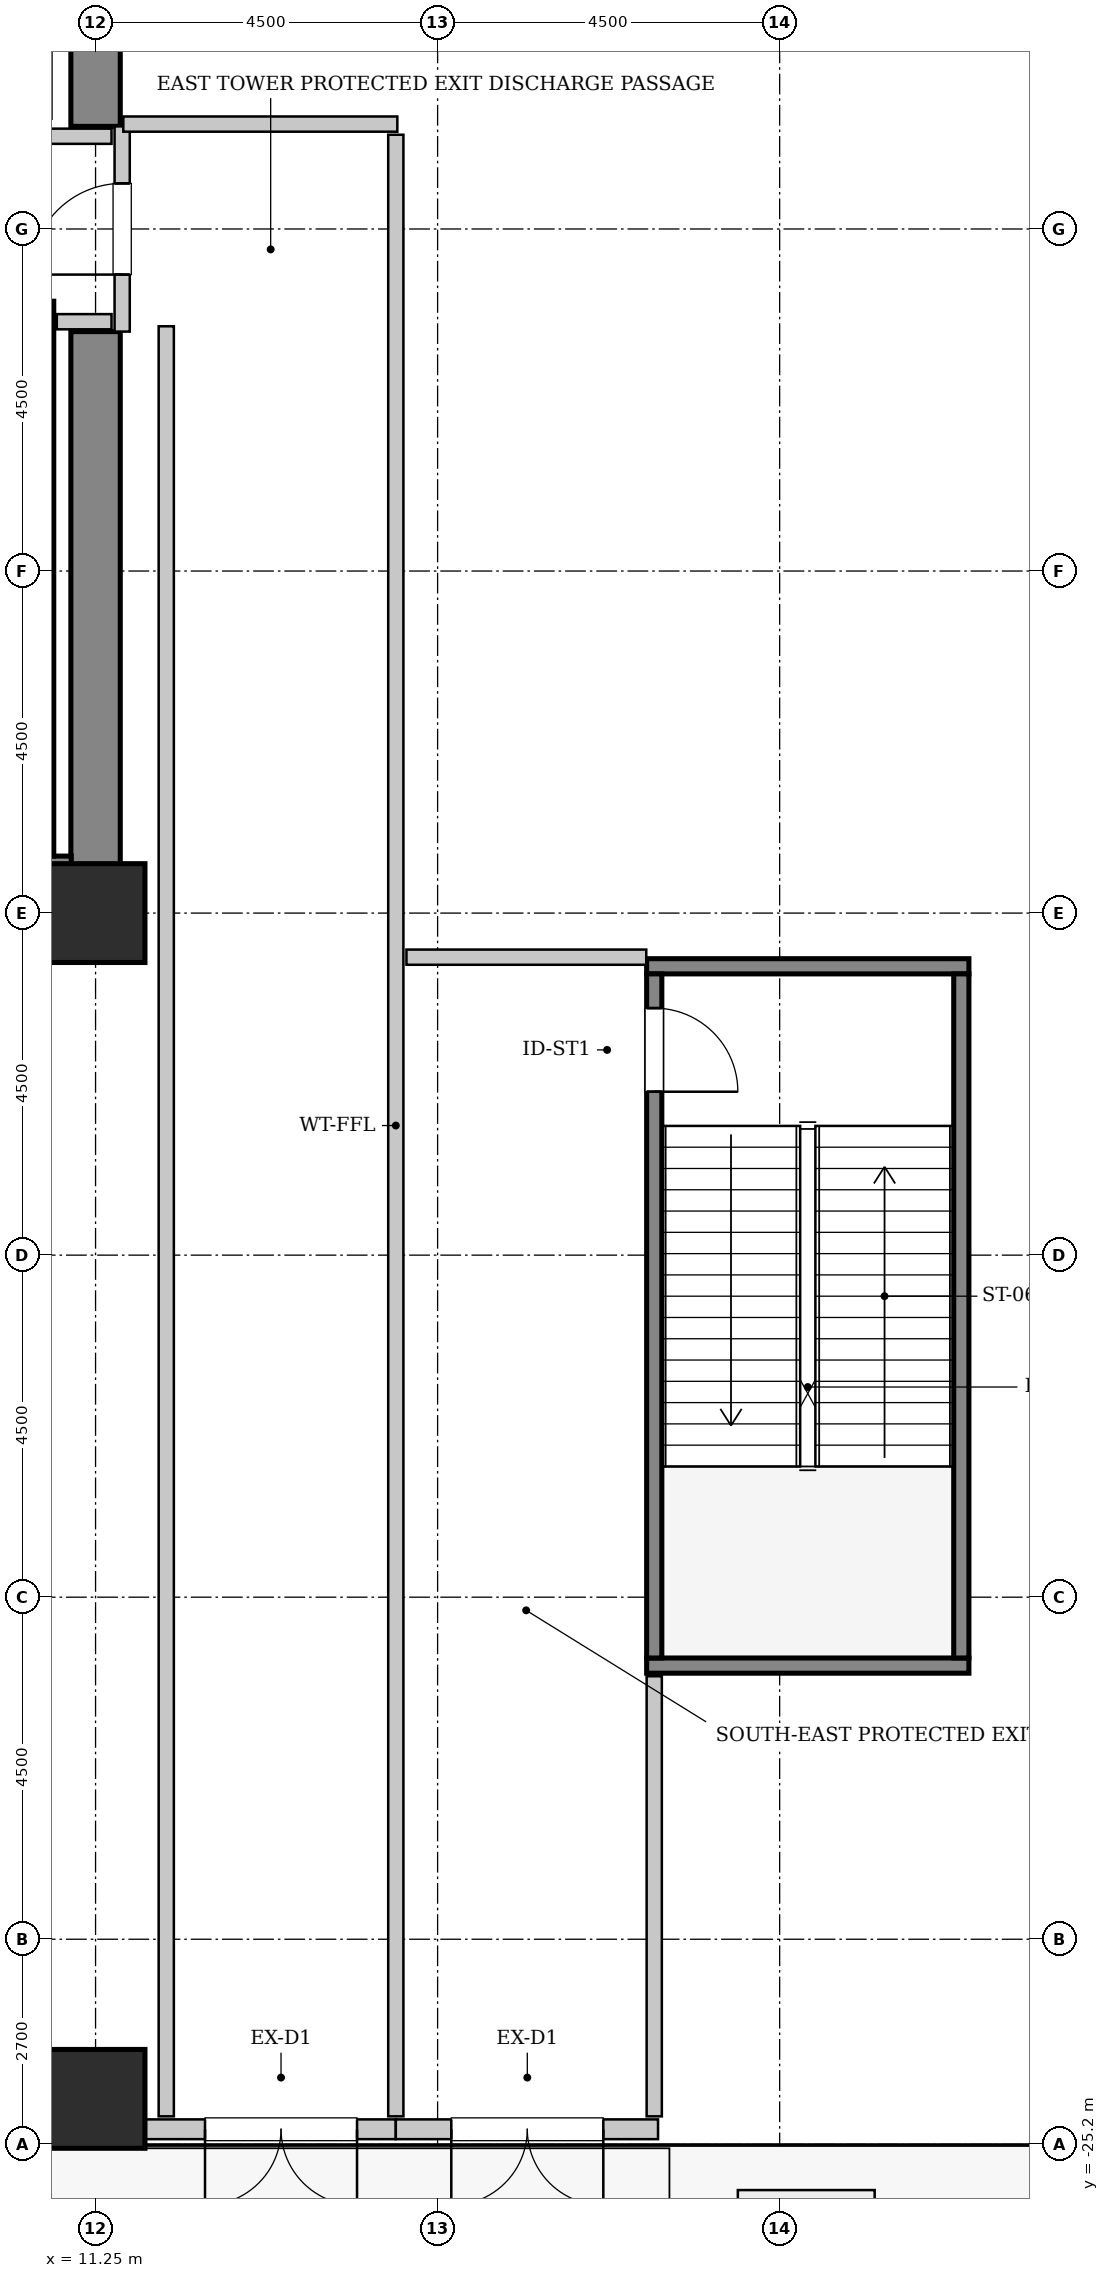
"""IFC4 building model, lengths in metres.
Left out: names, types, materials, properties, quantities, classifications, styles, units other than length and angle.
Written with IfcOpenShell. Run it as: python <this file> out.ifc"""

import sys

from ifc_helpers import new_model, si_unit, direction, frame, frame_2d, origin, origin_2d, place, context, subcontext, project, spatial, rectangle, hollow_rectangle, extrude, source, transform, mapped, element, fill, save


model = new_model("IFC4")
c1 = context("Model", 3, precision=1e-05, world=origin(), true_north=direction((0.0, 1.0)))
c2 = subcontext(c1, "Body", "Model", "MODEL_VIEW")
j1 = project(units=[si_unit("LENGTHUNIT", "METRE"), si_unit("PLANEANGLEUNIT", "RADIAN")], contexts=[c1])
p1 = place(None, origin())
s1 = spatial("IfcSite", under=j1, at=p1, CompositionType="ELEMENT")
p2 = place(p1, origin())
s2 = spatial("IfcBuilding", under=s1, at=p2, CompositionType="ELEMENT")
p3 = place(p2, origin())
s3 = spatial("IfcBuildingStorey", under=s2, at=p3, CompositionType="ELEMENT", Elevation=0.0)
m1 = source(origin(), c2, "Body", "SweptSolid", [
    extrude(rectangle(XDim=10.025, YDim=0.65, at=frame_2d((5.012, 0.0))), origin(), (0.0, 0.0, 1.0), 6.0),
])
p4 = place(p3, frame((1.55, -9.0, 0.0), z_axis=(0.0, 0.0, 1.0), x_axis=(1.0, 0.0, 0.0)))
e1 = element("IfcWall", 1, at=p4, inside=s3, PredefinedType="SHEAR", context=c2, shape_type="MappedRepresentation", body=[
    mapped(m1, transform((0.0, 0.0, 0.0), x_axis=(1.0, 0.0, 0.0), y_axis=(0.0, 1.0, 0.0), z_axis=(0.0, 0.0, 1.0), scale=1.0)),
])
m2 = source(origin(), c2, "Body", "SweptSolid", [
    extrude(rectangle(XDim=7.325, YDim=0.65, at=frame_2d((3.663, 0.0))), origin(), (0.0, 0.0, 1.0), 6.0),
])
for number, where, z_axis, x_axis in (
    (2, (11.25, -8.675, 0.0), (0.0, 0.0, 1.0), (0.0, 1.0, 0.0)),
    (3, (11.25, 1.35, 0.0), (0.0, 0.0, 1.0), (0.0, 1.0, 0.0)),
):
    element("IfcWall", number, at=place(p3, frame(where, z_axis=z_axis, x_axis=x_axis)), inside=s3, PredefinedType="SHEAR", context=c2, shape_type="MappedRepresentation", body=[
        mapped(m2, transform((0.0, 0.0, 0.0), x_axis=(1.0, 0.0, 0.0), y_axis=(0.0, 1.0, 0.0), z_axis=(0.0, 0.0, 1.0), scale=1.0)),
    ])
m3 = source(origin(), c2, "Body", "SweptSolid", [
    extrude(hollow_rectangle(XDim=1.3, YDim=1.3, WallThickness=0.065, InnerFilletRadius=0.065, OuterFilletRadius=0.13, at=origin_2d()), origin(), (0.0, 0.0, 1.0), 6.0),
])
for number, where, z_axis, x_axis in (
    (4, (11.25, -24.6, 0.0), (0.0, 0.0, 1.0), (1.0, 0.0, 0.0)),
    (5, (11.25, -9.0, 0.0), (0.0, 0.0, 1.0), (1.0, 0.0, 0.0)),
):
    element("IfcColumn", number, at=place(p3, frame(where, z_axis=z_axis, x_axis=x_axis)), inside=s3, PredefinedType="COLUMN", context=c2, shape_type="MappedRepresentation", body=[
        mapped(m3, transform((0.0, 0.0, 0.0), x_axis=(1.0, 0.0, 0.0), y_axis=(0.0, 1.0, 0.0), z_axis=(0.0, 0.0, 1.0), scale=1.0)),
    ])
m4 = source(origin(), c2, "Body", "SweptSolid", [
    extrude(rectangle(XDim=3.32, YDim=0.26, at=frame_2d((1.66, 0.0))), origin(), (0.0, 0.0, 1.0), 5.7),
])
p5 = place(p3, frame((15.2, -25.0, 0.0), z_axis=(0.0, 0.0, 1.0), x_axis=(-1.0, 0.0, 0.0)))
e6 = element("IfcWall", 6, at=p5, inside=s3, PredefinedType="SOLIDWALL", context=c2, shape_type="MappedRepresentation", body=[
    mapped(m4, transform((0.0, 0.0, 0.0), x_axis=(1.0, 0.0, 0.0), y_axis=(0.0, 1.0, 0.0), z_axis=(0.0, 0.0, 1.0), scale=1.0)),
])
p6 = place(p5, frame((0.51, 0.0, 0.0)))
e7 = element("IfcOpeningElement", 7, at=p6, cuts=e6, PredefinedType="OPENING", context=c2, shape_type="SweptSolid", body=[
    extrude(rectangle(XDim=2.0, YDim=2.4, at=frame_2d((1.0, 1.2))), frame((0.0, 0.14, 0.0), z_axis=(0.0, -1.0, 0.0), x_axis=(1.0, 0.0, 0.0)), (0.0, 0.0, 1.0), 0.28),
])
m5 = source(origin(), c2, "Body", "SweptSolid", [
    extrude(rectangle(XDim=3.45, YDim=0.26, at=frame_2d((1.725, 0.0))), origin(), (0.0, 0.0, 1.0), 5.7),
])
p7 = place(p3, frame((18.65, -25.0, 0.0), z_axis=(0.0, 0.0, 1.0), x_axis=(-1.0, 0.0, 0.0)))
e8 = element("IfcWall", 8, at=p7, inside=s3, PredefinedType="SOLIDWALL", context=c2, shape_type="MappedRepresentation", body=[
    mapped(m5, transform((0.0, 0.0, 0.0), x_axis=(1.0, 0.0, 0.0), y_axis=(0.0, 1.0, 0.0), z_axis=(0.0, 0.0, 1.0), scale=1.0)),
])
p8 = place(p7, frame((0.72, 0.0, 0.0)))
e9 = element("IfcOpeningElement", 9, at=p8, cuts=e8, PredefinedType="OPENING", context=c2, shape_type="SweptSolid", body=[
    extrude(rectangle(XDim=2.0, YDim=2.4, at=frame_2d((1.0, 1.2))), frame((0.0, 0.14, 0.0), z_axis=(0.0, -1.0, 0.0), x_axis=(1.0, 0.0, 0.0)), (0.0, 0.0, 1.0), 0.28),
])
m6 = source(origin(), c2, "Body", "SweptSolid", [
    extrude(rectangle(XDim=3.4, YDim=0.2, at=frame_2d((1.7, 0.0))), origin(), (0.0, 0.0, 1.0), 6.0),
])
p9 = place(p3, frame((7.3, -1.05, 0.0), z_axis=(0.0, 0.0, 1.0), x_axis=(1.0, 0.0, 0.0)))
e10 = element("IfcWall", 10, at=p9, inside=s3, PredefinedType="SOLIDWALL", context=c2, shape_type="MappedRepresentation", body=[
    mapped(m6, transform((0.0, 0.0, 0.0), x_axis=(1.0, 0.0, 0.0), y_axis=(0.0, 1.0, 0.0), z_axis=(0.0, 0.0, 1.0), scale=1.0)),
])
m7 = source(origin(), c2, "Body", "SweptSolid", [
    extrude(rectangle(XDim=3.63, YDim=0.2, at=frame_2d((1.815, 0.0))), origin(), (0.0, 0.0, 1.0), 6.0),
])
p10 = place(p3, frame((7.3, -8.35, 0.0), z_axis=(0.0, 0.0, 1.0), x_axis=(1.0, 0.0, 0.0)))
e11 = element("IfcWall", 11, at=p10, inside=s3, PredefinedType="SOLIDWALL", context=c2, shape_type="MappedRepresentation", body=[
    mapped(m7, transform((0.0, 0.0, 0.0), x_axis=(1.0, 0.0, 0.0), y_axis=(0.0, 1.0, 0.0), z_axis=(0.0, 0.0, 1.0), scale=1.0)),
])
m8 = source(origin(), c2, "Body", "SweptSolid", [
    extrude(rectangle(XDim=7.1, YDim=0.2, at=frame_2d((3.55, 0.0))), origin(), (0.0, 0.0, 1.0), 6.0),
])
p11 = place(p3, frame((10.6, -1.15, 0.0), z_axis=(0.0, 0.0, 1.0), x_axis=(0.0, -1.0, 0.0)))
e12 = element("IfcWall", 12, at=p11, inside=s3, PredefinedType="SOLIDWALL", context=c2, shape_type="MappedRepresentation", body=[
    mapped(m8, transform((0.0, 0.0, 0.0), x_axis=(1.0, 0.0, 0.0), y_axis=(0.0, 1.0, 0.0), z_axis=(0.0, 0.0, 1.0), scale=1.0)),
])
m9 = source(origin(), c2, "Body", "SweptSolid", [
    extrude(rectangle(XDim=4.24, YDim=0.2, at=frame_2d((2.12, 0.0))), origin(), (0.0, 0.0, 1.0), 6.0),
])
for number, where, z_axis, x_axis in (
    (13, (18.5, -9.7, 0.0), (0.0, 0.0, 1.0), (1.0, 0.0, 0.0)),
    (14, (18.5, -18.9, 0.0), (0.0, 0.0, 1.0), (1.0, 0.0, 0.0)),
):
    element("IfcWall", number, at=place(p3, frame(where, z_axis=z_axis, x_axis=x_axis)), inside=s3, PredefinedType="SOLIDWALL", context=c2, shape_type="MappedRepresentation", body=[
        mapped(m9, transform((0.0, 0.0, 0.0), x_axis=(1.0, 0.0, 0.0), y_axis=(0.0, 1.0, 0.0), z_axis=(0.0, 0.0, 1.0), scale=1.0)),
    ])
m10 = source(origin(), c2, "Body", "SweptSolid", [
    extrude(rectangle(XDim=9.0, YDim=0.2, at=frame_2d((4.5, 0.0))), origin(), (0.0, 0.0, 1.0), 6.0),
])
p12 = place(p3, frame((18.6, -9.8, 0.0), z_axis=(0.0, 0.0, 1.0), x_axis=(0.0, -1.0, 0.0)))
e15 = element("IfcWall", 15, at=p12, inside=s3, PredefinedType="SOLIDWALL", context=c2, shape_type="MappedRepresentation", body=[
    mapped(m10, transform((0.0, 0.0, 0.0), x_axis=(1.0, 0.0, 0.0), y_axis=(0.0, 1.0, 0.0), z_axis=(0.0, 0.0, 1.0), scale=1.0)),
])
p13 = place(p12, frame((0.45, 0.0, 0.0)))
e16 = element("IfcOpeningElement", 16, at=p13, cuts=e15, PredefinedType="OPENING", context=c2, shape_type="SweptSolid", body=[
    extrude(rectangle(XDim=1.1, YDim=2.15, at=frame_2d((0.55, 1.075))), frame((0.0, 0.11, 0.0), z_axis=(0.0, -1.0, 0.0), x_axis=(1.0, 0.0, 0.0)), (0.0, 0.0, 1.0), 0.22),
])
p14 = place(p3, frame((22.64, -9.8, 0.0), z_axis=(0.0, 0.0, 1.0), x_axis=(0.0, -1.0, 0.0)))
e17 = element("IfcWall", 17, at=p14, inside=s3, PredefinedType="SOLIDWALL", context=c2, shape_type="MappedRepresentation", body=[
    mapped(m10, transform((0.0, 0.0, 0.0), x_axis=(1.0, 0.0, 0.0), y_axis=(0.0, 1.0, 0.0), z_axis=(0.0, 0.0, 1.0), scale=1.0)),
])
m11 = source(origin(), c2, "Body", "SweptSolid", [
    extrude(rectangle(XDim=2.7, YDim=0.2, at=frame_2d((1.35, 0.0))), origin(), (0.0, 0.0, 1.0), 4.575),
])
p15 = place(p3, frame((11.6, -1.35, 0.0), z_axis=(0.0, 0.0, 1.0), x_axis=(0.0, 1.0, 0.0)))
e18 = element("IfcWall", 18, at=p15, inside=s3, PredefinedType="PARTITIONING", context=c2, shape_type="MappedRepresentation", body=[
    mapped(m11, transform((0.0, 0.0, 0.0), x_axis=(1.0, 0.0, 0.0), y_axis=(0.0, 1.0, 0.0), z_axis=(0.0, 0.0, 1.0), scale=1.0)),
])
p16 = place(p15, frame((0.75, 0.0, 0.0)))
e19 = element("IfcOpeningElement", 19, at=p16, cuts=e18, PredefinedType="OPENING", context=c2, shape_type="SweptSolid", body=[
    extrude(rectangle(XDim=1.2, YDim=2.15, at=frame_2d((0.6, 1.075))), frame((0.0, 0.11, 0.0), z_axis=(0.0, -1.0, 0.0), x_axis=(1.0, 0.0, 0.0)), (0.0, 0.0, 1.0), 0.22),
])
m12 = source(origin(), c2, "Body", "SweptSolid", [
    extrude(rectangle(XDim=4.11, YDim=0.2, at=frame_2d((2.055, 0.0))), origin(), (0.0, 0.0, 1.0), 5.685),
])
p17 = place(p3, frame((7.35, 1.22, 0.0), z_axis=(0.0, 0.0, 1.0), x_axis=(1.0, 0.0, 0.0)))
e20 = element("IfcWall", 20, at=p17, inside=s3, PredefinedType="PARTITIONING", context=c2, shape_type="MappedRepresentation", body=[
    mapped(m12, transform((0.0, 0.0, 0.0), x_axis=(1.0, 0.0, 0.0), y_axis=(0.0, 1.0, 0.0), z_axis=(0.0, 0.0, 1.0), scale=1.0)),
])
m13 = source(origin(), c2, "Body", "SweptSolid", [
    extrude(rectangle(XDim=0.72, YDim=0.2, at=frame_2d((0.36, 0.0))), origin(), (0.0, 0.0, 1.0), 5.685),
])
p18 = place(p3, frame((10.74, -1.22, 0.0), z_axis=(0.0, 0.0, 1.0), x_axis=(1.0, 0.0, 0.0)))
e21 = element("IfcWall", 21, at=p18, inside=s3, PredefinedType="PARTITIONING", context=c2, shape_type="MappedRepresentation", body=[
    mapped(m13, transform((0.0, 0.0, 0.0), x_axis=(1.0, 0.0, 0.0), y_axis=(0.0, 1.0, 0.0), z_axis=(0.0, 0.0, 1.0), scale=1.0)),
])
m14 = source(origin(), c2, "Body", "SweptSolid", [
    extrude(rectangle(XDim=23.55, YDim=0.2, at=frame_2d((11.775, 0.0))), origin(), (0.0, 0.0, 1.0), 5.685),
])
p19 = place(p3, frame((12.18, -24.83, 0.0), z_axis=(0.0, 0.0, 1.0), x_axis=(0.0, 1.0, 0.0)))
e22 = element("IfcWall", 22, at=p19, inside=s3, PredefinedType="PARTITIONING", context=c2, shape_type="MappedRepresentation", body=[
    mapped(m14, transform((0.0, 0.0, 0.0), x_axis=(1.0, 0.0, 0.0), y_axis=(0.0, 1.0, 0.0), z_axis=(0.0, 0.0, 1.0), scale=1.0)),
])
m15 = source(origin(), c2, "Body", "SweptSolid", [
    extrude(rectangle(XDim=3.605, YDim=0.2, at=frame_2d((1.802, 0.0))), origin(), (0.0, 0.0, 1.0), 5.685),
])
p20 = place(p3, frame((11.615, 1.38, 0.0), z_axis=(0.0, 0.0, 1.0), x_axis=(1.0, 0.0, 0.0)))
e23 = element("IfcWall", 23, at=p20, inside=s3, PredefinedType="PARTITIONING", context=c2, shape_type="MappedRepresentation", body=[
    mapped(m15, transform((0.0, 0.0, 0.0), x_axis=(1.0, 0.0, 0.0), y_axis=(0.0, 1.0, 0.0), z_axis=(0.0, 0.0, 1.0), scale=1.0)),
])
m16 = source(origin(), c2, "Body", "SweptSolid", [
    extrude(rectangle(XDim=26.07, YDim=0.2, at=frame_2d((13.035, 0.0))), origin(), (0.0, 0.0, 1.0), 5.685),
])
p21 = place(p3, frame((15.2, -24.83, 0.0), z_axis=(0.0, 0.0, 1.0), x_axis=(0.0, 1.0, 0.0)))
e24 = element("IfcWall", 24, at=p21, inside=s3, PredefinedType="PARTITIONING", context=c2, shape_type="MappedRepresentation", body=[
    mapped(m16, transform((0.0, 0.0, 0.0), x_axis=(1.0, 0.0, 0.0), y_axis=(0.0, 1.0, 0.0), z_axis=(0.0, 0.0, 1.0), scale=1.0)),
])
m17 = source(origin(), c2, "Body", "SweptSolid", [
    extrude(rectangle(XDim=3.155, YDim=0.2, at=frame_2d((1.578, 0.0))), origin(), (0.0, 0.0, 1.0), 5.685),
])
p22 = place(p3, frame((15.34, -9.58, 0.0), z_axis=(0.0, 0.0, 1.0), x_axis=(1.0, 0.0, 0.0)))
e25 = element("IfcWall", 25, at=p22, inside=s3, PredefinedType="PARTITIONING", context=c2, shape_type="MappedRepresentation", body=[
    mapped(m17, transform((0.0, 0.0, 0.0), x_axis=(1.0, 0.0, 0.0), y_axis=(0.0, 1.0, 0.0), z_axis=(0.0, 0.0, 1.0), scale=1.0)),
])
m18 = source(origin(), c2, "Body", "SweptSolid", [
    extrude(rectangle(XDim=5.79, YDim=0.2, at=frame_2d((2.895, 0.0))), origin(), (0.0, 0.0, 1.0), 5.685),
])
p23 = place(p3, frame((18.6, -24.83, 0.0), z_axis=(0.0, 0.0, 1.0), x_axis=(0.0, 1.0, 0.0)))
e26 = element("IfcWall", 26, at=p23, inside=s3, PredefinedType="PARTITIONING", context=c2, shape_type="MappedRepresentation", body=[
    mapped(m18, transform((0.0, 0.0, 0.0), x_axis=(1.0, 0.0, 0.0), y_axis=(0.0, 1.0, 0.0), z_axis=(0.0, 0.0, 1.0), scale=1.0)),
])
m19 = source(origin(), c2, "Body", "SweptSolid", [
    extrude(rectangle(XDim=2.0, YDim=2.4, at=frame_2d((1.0, 1.2))), frame((0.0, 0.025, 0.0), z_axis=(0.0, -1.0, 0.0), x_axis=(1.0, 0.0, 0.0)), (0.0, 0.0, 1.0), 0.05),
])
p24 = place(p6, origin())
e27 = element("IfcDoor", 27, at=p24, inside=s3, OperationType="DOUBLE_DOOR_SINGLE_SWING", PredefinedType="DOOR", context=c2, shape_type="MappedRepresentation", body=[
    mapped(m19, transform((0.0, 0.0, 0.0), x_axis=(1.0, 0.0, 0.0), y_axis=(0.0, 1.0, 0.0), z_axis=(0.0, 0.0, 1.0), scale=1.0)),
])
fill(e7, e27)
p25 = place(p8, origin())
e28 = element("IfcDoor", 28, at=p25, inside=s3, OperationType="DOUBLE_DOOR_SINGLE_SWING", PredefinedType="DOOR", context=c2, shape_type="MappedRepresentation", body=[
    mapped(m19, transform((0.0, 0.0, 0.0), x_axis=(1.0, 0.0, 0.0), y_axis=(0.0, 1.0, 0.0), z_axis=(0.0, 0.0, 1.0), scale=1.0)),
])
fill(e9, e28)
m20 = source(origin(), c2, "Body", "SweptSolid", [
    extrude(rectangle(XDim=1.1, YDim=2.15, at=frame_2d((0.55, 1.075))), frame((0.0, 0.025, 0.0), z_axis=(0.0, -1.0, 0.0), x_axis=(1.0, 0.0, 0.0)), (0.0, 0.0, 1.0), 0.05),
])
p26 = place(p13, frame((1.1, 0.0, 0.0), z_axis=(0.0, 0.0, 1.0), x_axis=(-1.0, 0.0, 0.0)))
e29 = element("IfcDoor", 29, at=p26, inside=s3, OperationType="SINGLE_SWING_RIGHT", PredefinedType="DOOR", context=c2, shape_type="MappedRepresentation", body=[
    mapped(m20, transform((0.0, 0.0, 0.0), x_axis=(1.0, 0.0, 0.0), y_axis=(0.0, 1.0, 0.0), z_axis=(0.0, 0.0, 1.0), scale=1.0)),
])
fill(e16, e29)
m21 = source(origin(), c2, "Body", "SweptSolid", [
    extrude(rectangle(XDim=1.2, YDim=2.15, at=frame_2d((0.6, 1.075))), frame((0.0, 0.025, 0.0), z_axis=(0.0, -1.0, 0.0), x_axis=(1.0, 0.0, 0.0)), (0.0, 0.0, 1.0), 0.05),
])
p27 = place(p16, frame((1.2, 0.0, 0.0), z_axis=(0.0, 0.0, 1.0), x_axis=(-1.0, 0.0, 0.0)))
e30 = element("IfcDoor", 30, at=p27, inside=s3, OperationType="SINGLE_SWING_LEFT", PredefinedType="DOOR", context=c2, shape_type="MappedRepresentation", body=[
    mapped(m21, transform((0.0, 0.0, 0.0), x_axis=(1.0, 0.0, 0.0), y_axis=(0.0, 1.0, 0.0), z_axis=(0.0, 0.0, 1.0), scale=1.0)),
])
fill(e19, e30)
save(model, sys.argv[1])
